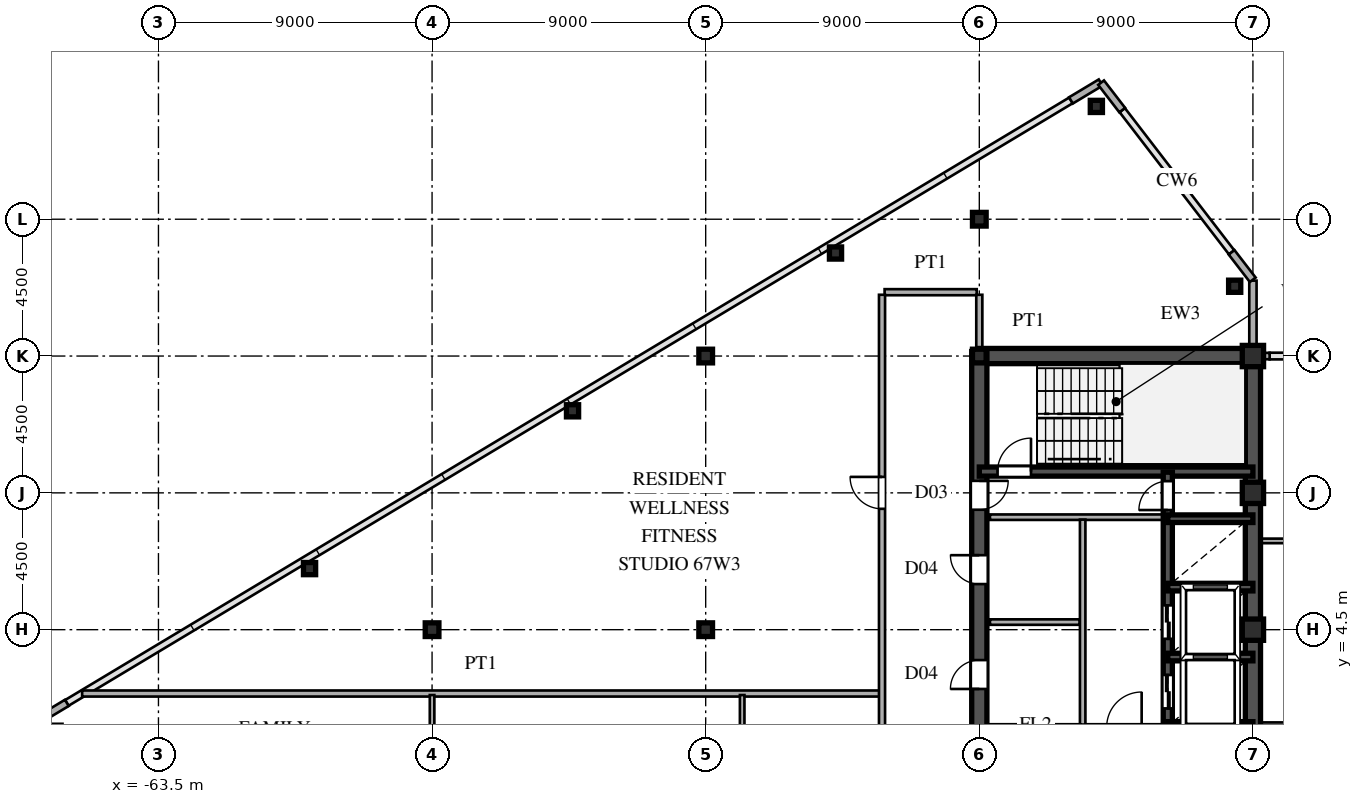
"""IFC4 building model, lengths in metres.
Left out: names, types, materials, properties, quantities, classifications, styles, units other than length and angle.
Written with IfcOpenShell. Run it as: python <this file> out.ifc"""

import sys

from ifc_helpers import new_model, si_unit, direction, frame, frame_2d, origin, origin_2d, place, context, subcontext, project, spatial, rectangle, hollow_rectangle, i_section, extrude, source, transform, mapped, element, fill, save


model = new_model("IFC4")
c1 = context("Model", 3, precision=1e-05, world=origin(), true_north=direction((0.0, 1.0)))
c2 = subcontext(c1, "Body", "Model", "MODEL_VIEW")
j1 = project(units=[si_unit("LENGTHUNIT", "METRE"), si_unit("PLANEANGLEUNIT", "RADIAN")], contexts=[c1])
p1 = place(None, origin())
s1 = spatial("IfcSite", under=j1, at=p1, CompositionType="ELEMENT")
p2 = place(p1, origin())
s2 = spatial("IfcBuilding", under=s1, at=p2, CompositionType="ELEMENT")
p3 = place(p2, frame((0.0, 0.0, 254.4)))
s3 = spatial("IfcBuildingStorey", under=s2, at=p3, CompositionType="ELEMENT", Elevation=254.4)
m1 = source(origin(), c2, "Body", "SweptSolid", [
    extrude(hollow_rectangle(XDim=0.7, YDim=0.7, WallThickness=0.03, at=origin_2d()), origin(), (0.0, 0.0, 1.0), 3.75),
])
for number, where, z_axis, x_axis in (
    (1, (-27.5, 4.5, 0.0), (0.0, 0.0, 1.0), (1.0, 0.0, 0.0)),
    (2, (-27.5, 9.0, 0.0), (0.0, 0.0, 1.0), (1.0, 0.0, 0.0)),
    (3, (-27.5, 13.5, 0.0), (0.0, 0.0, 1.0), (1.0, 0.0, 0.0)),
):
    element("IfcColumn", number, at=place(p3, frame(where, z_axis=z_axis, x_axis=x_axis)), inside=s3, PredefinedType="COLUMN", context=c2, shape_type="MappedRepresentation", body=[
        mapped(m1, transform((0.0, 0.0, 0.0), scale=1.0)),
    ])
m2 = source(origin(), c2, "Body", "SweptSolid", [
    extrude(i_section(OverallWidth=0.45, OverallDepth=0.45, WebThickness=0.016, FlangeThickness=0.025, at=origin_2d()), origin(), (0.0, 0.0, 1.0), 3.75),
])
for number, where, z_axis, x_axis in (
    (4, (-36.5, 13.5, 0.0), (0.0, 0.0, 1.0), (1.0, 0.0, 0.0)),
    (5, (-36.5, 18.0, 0.0), (0.0, 0.0, 1.0), (1.0, 0.0, 0.0)),
    (6, (-45.5, 4.5, 0.0), (0.0, 0.0, 1.0), (1.0, 0.0, 0.0)),
    (7, (-45.5, 13.5, 0.0), (0.0, 0.0, 1.0), (1.0, 0.0, 0.0)),
    (8, (-54.5, 4.5, 0.0), (0.0, 0.0, 1.0), (1.0, 0.0, 0.0)),
):
    element("IfcColumn", number, at=place(p3, frame(where, z_axis=z_axis, x_axis=x_axis)), inside=s3, PredefinedType="COLUMN", context=c2, shape_type="MappedRepresentation", body=[
        mapped(m2, transform((0.0, 0.0, 0.0), scale=1.0)),
    ])
m3 = source(origin(), c2, "Body", "SweptSolid", [
    extrude(hollow_rectangle(XDim=0.4, YDim=0.4, WallThickness=0.016, at=origin_2d()), origin(), (0.0, 0.0, 1.0), 3.75),
])
for number, where, z_axis, x_axis in (
    (9, (-28.1, 15.796, 0.0), (0.0, 0.0, 1.0), (1.0, 0.0, 0.0)),
    (10, (-32.65, 21.71, 0.0), (0.0, 0.0, 1.0), (1.0, 0.0, 0.0)),
    (11, (-41.23, 16.889, 0.0), (0.0, 0.0, 1.0), (1.0, 0.0, 0.0)),
    (12, (-49.88, 11.699, 0.0), (0.0, 0.0, 1.0), (1.0, 0.0, 0.0)),
    (13, (-58.53, 6.509, 0.0), (0.0, 0.0, 1.0), (1.0, 0.0, 0.0)),
):
    element("IfcColumn", number, at=place(p3, frame(where, z_axis=z_axis, x_axis=x_axis)), inside=s3, PredefinedType="COLUMN", context=c2, shape_type="MappedRepresentation", body=[
        mapped(m3, transform((0.0, 0.0, 0.0), scale=1.0)),
    ])
p4 = place(p3, frame((-27.5, 13.755, 0.0), z_axis=(0.0, 0.0, 1.0), x_axis=(0.0, 1.0, 0.0)))
e14 = element("IfcWall", 14, at=p4, inside=s3, PredefinedType="SOLIDWALL", context=c2, shape_type="SweptSolid", body=[
    extrude(rectangle(XDim=0.62, YDim=0.24, at=frame_2d((0.31, 0.0))), origin(), (0.0, 0.0, 1.0), 3.03),
])
p5 = place(p3, frame((-27.5, 14.375, 0.0), z_axis=(0.0, 0.0, 1.0), x_axis=(0.0, 1.0, 0.0)))
e15 = element("IfcWall", 15, at=p5, inside=s3, PredefinedType="SOLIDWALL", context=c2, shape_type="SweptSolid", body=[
    extrude(rectangle(XDim=1.605, YDim=0.24, at=frame_2d((0.803, 0.0))), origin(), (0.0, 0.0, 1.0), 3.53),
])
for number, where, z_axis, x_axis in (
    (16, (-27.506, 16.008, 0.0), (0.0, 0.0, 1.0), (-0.61, 0.793, 0.0)),
    (17, (-31.799, 21.588, 0.0), (0.0, 0.0, 1.0), (-0.61, 0.793, 0.0)),
    (18, (-32.509, 22.495, 0.0), (0.0, 0.0, 1.0), (-0.857, -0.515, 0.0)),
    (19, (-66.514, 2.092, 0.0), (0.0, 0.0, 1.0), (-0.857, -0.515, 0.0)),
):
    element("IfcWall", number, at=place(p3, frame(where, z_axis=z_axis, x_axis=x_axis)), inside=s3, PredefinedType="SOLIDWALL", context=c2, shape_type="SweptSolid", body=[
        extrude(rectangle(XDim=1.14, YDim=0.24, at=frame_2d((0.57, 0.0))), origin(), (0.0, 0.0, 1.0), 3.53),
    ])
p6 = place(p3, frame((-27.49, 13.5, 0.0), z_axis=(0.0, 0.0, 1.0), x_axis=(1.0, 0.0, 0.0)))
e20 = element("IfcWall", 20, at=p6, inside=s3, PredefinedType="SOLIDWALL", context=c2, shape_type="SweptSolid", body=[
    extrude(rectangle(XDim=0.54, YDim=0.21, at=frame_2d((0.27, 0.0))), origin(), (0.0, 0.0, 1.0), 3.03),
])
p7 = place(p3, frame((-27.5, 1.3, 0.0), z_axis=(0.0, 0.0, 1.0), x_axis=(0.0, 1.0, 0.0)))
e21 = element("IfcWall", 21, at=p7, inside=s3, PredefinedType="SHEAR", context=c2, shape_type="SweptSolid", body=[
    extrude(rectangle(XDim=12.2, YDim=0.5, at=frame_2d((6.1, 0.0))), origin(), (0.0, 0.0, 1.0), 3.53),
])
p8 = place(p3, frame((-36.5, 13.5, 0.0), z_axis=(0.0, 0.0, 1.0), x_axis=(1.0, 0.0, 0.0)))
e22 = element("IfcWall", 22, at=p8, inside=s3, PredefinedType="SHEAR", context=c2, shape_type="SweptSolid", body=[
    extrude(rectangle(XDim=9.0, YDim=0.5, at=frame_2d((4.5, 0.0))), origin(), (0.0, 0.0, 1.0), 3.53),
])
p9 = place(p3, frame((-36.5, 8.2, 0.0), z_axis=(0.0, 0.0, 1.0), x_axis=(0.0, 1.0, 0.0)))
e23 = element("IfcWall", 23, at=p9, inside=s3, PredefinedType="SHEAR", context=c2, shape_type="SweptSolid", body=[
    extrude(rectangle(XDim=5.45, YDim=0.5, at=frame_2d((2.725, 0.0))), origin(), (0.0, 0.0, 1.0), 3.53),
])
p10 = place(p9, frame((0.245, 0.0, 0.0)))
e24 = element("IfcOpeningElement", 24, at=p10, cuts=e23, PredefinedType="OPENING", context=c2, shape_type="SweptSolid", body=[
    extrude(rectangle(XDim=0.95, YDim=2.15, at=frame_2d((0.475, 1.075))), frame((0.0, 0.26, 0.0), z_axis=(0.0, -1.0, 0.0), x_axis=(1.0, 0.0, 0.0)), (0.0, 0.0, 1.0), 0.52),
])
p11 = place(p3, frame((-36.5, 1.3, 0.0), z_axis=(0.0, 0.0, 1.0), x_axis=(0.0, 1.0, 0.0)))
e25 = element("IfcWall", 25, at=p11, inside=s3, PredefinedType="SHEAR", context=c2, shape_type="SweptSolid", body=[
    extrude(rectangle(XDim=3.45, YDim=0.5, at=frame_2d((1.725, 0.0))), origin(), (0.0, 0.0, 1.0), 3.53),
])
p12 = place(p11, frame((1.25, 0.0, 0.0)))
e26 = element("IfcOpeningElement", 26, at=p12, cuts=e25, PredefinedType="OPENING", context=c2, shape_type="SweptSolid", body=[
    extrude(rectangle(XDim=0.95, YDim=2.15, at=frame_2d((0.475, 1.075))), frame((0.0, 0.26, 0.0), z_axis=(0.0, -1.0, 0.0), x_axis=(1.0, 0.0, 0.0)), (0.0, 0.0, 1.0), 0.52),
])
p13 = place(p3, frame((-36.5, 4.75, 0.0), z_axis=(0.0, 0.0, 1.0), x_axis=(0.0, 1.0, 0.0)))
e27 = element("IfcWall", 27, at=p13, inside=s3, PredefinedType="SHEAR", context=c2, shape_type="SweptSolid", body=[
    extrude(rectangle(XDim=3.45, YDim=0.5, at=frame_2d((1.725, 0.0))), origin(), (0.0, 0.0, 1.0), 3.53),
])
p14 = place(p13, frame((1.25, 0.0, 0.0)))
e28 = element("IfcOpeningElement", 28, at=p14, cuts=e27, PredefinedType="OPENING", context=c2, shape_type="SweptSolid", body=[
    extrude(rectangle(XDim=0.95, YDim=2.15, at=frame_2d((0.475, 1.075))), frame((0.0, 0.26, 0.0), z_axis=(0.0, -1.0, 0.0), x_axis=(1.0, 0.0, 0.0)), (0.0, 0.0, 1.0), 0.52),
])
p15 = place(p3, frame((-36.5, 9.7, 0.0), z_axis=(0.0, 0.0, 1.0), x_axis=(1.0, 0.0, 0.0)))
e29 = element("IfcWall", 29, at=p15, inside=s3, PredefinedType="SHEAR", context=c2, shape_type="SweptSolid", body=[
    extrude(rectangle(XDim=9.0, YDim=0.3, at=frame_2d((4.5, 0.0))), origin(), (0.0, 0.0, 1.0), 3.53),
])
p16 = place(p15, frame((0.6, 0.0, 0.0)))
e30 = element("IfcOpeningElement", 30, at=p16, cuts=e29, PredefinedType="OPENING", context=c2, shape_type="SweptSolid", body=[
    extrude(rectangle(XDim=1.1, YDim=2.2, at=frame_2d((0.55, 1.1))), frame((0.0, 0.16, 0.0), z_axis=(0.0, -1.0, 0.0), x_axis=(1.0, 0.0, 0.0)), (0.0, 0.0, 1.0), 0.32),
])
for number, where, z_axis, x_axis in (
    (31, (-30.3, 1.35, 0.0), (0.0, 0.0, 1.0), (1.0, 0.0, 0.0)),
    (32, (-30.3, 3.6, 0.0), (0.0, 0.0, 1.0), (1.0, 0.0, 0.0)),
    (33, (-30.3, 5.9, 0.0), (0.0, 0.0, 1.0), (1.0, 0.0, 0.0)),
    (34, (-30.3, 8.15, 0.0), (0.0, 0.0, 1.0), (1.0, 0.0, 0.0)),
):
    element("IfcWall", number, at=place(p3, frame(where, z_axis=z_axis, x_axis=x_axis)), inside=s3, PredefinedType="SHEAR", context=c2, shape_type="SweptSolid", body=[
        extrude(rectangle(XDim=2.8, YDim=0.25, at=frame_2d((1.4, 0.0))), origin(), (0.0, 0.0, 1.0), 3.53),
    ])
p17 = place(p3, frame((-30.3, 1.32, 0.0), z_axis=(0.0, 0.0, 1.0), x_axis=(0.0, 1.0, 0.0)))
e35 = element("IfcWall", 35, at=p17, inside=s3, PredefinedType="SHEAR", context=c2, shape_type="SweptSolid", body=[
    extrude(rectangle(XDim=2.28, YDim=0.3, at=frame_2d((1.14, 0.0))), origin(), (0.0, 0.0, 1.0), 3.53),
])
p18 = place(p17, frame((0.59, 0.0, 0.0)))
e36 = element("IfcOpeningElement", 36, at=p18, cuts=e35, PredefinedType="OPENING", context=c2, shape_type="SweptSolid", body=[
    extrude(rectangle(XDim=1.1, YDim=2.2, at=frame_2d((0.55, 1.1))), frame((0.0, 0.16, 0.0), z_axis=(0.0, -1.0, 0.0), x_axis=(1.0, 0.0, 0.0)), (0.0, 0.0, 1.0), 0.32),
])
p19 = place(p3, frame((-30.3, 3.6, 0.0), z_axis=(0.0, 0.0, 1.0), x_axis=(0.0, 1.0, 0.0)))
e37 = element("IfcWall", 37, at=p19, inside=s3, PredefinedType="SHEAR", context=c2, shape_type="SweptSolid", body=[
    extrude(rectangle(XDim=2.3, YDim=0.3, at=frame_2d((1.15, 0.0))), origin(), (0.0, 0.0, 1.0), 3.53),
])
p20 = place(p19, frame((0.6, 0.0, 0.0)))
e38 = element("IfcOpeningElement", 38, at=p20, cuts=e37, PredefinedType="OPENING", context=c2, shape_type="SweptSolid", body=[
    extrude(rectangle(XDim=1.1, YDim=2.2, at=frame_2d((0.55, 1.1))), frame((0.0, 0.16, 0.0), z_axis=(0.0, -1.0, 0.0), x_axis=(1.0, 0.0, 0.0)), (0.0, 0.0, 1.0), 0.32),
])
p21 = place(p3, frame((-30.3, 5.9, 0.0), z_axis=(0.0, 0.0, 1.0), x_axis=(0.0, 1.0, 0.0)))
e39 = element("IfcWall", 39, at=p21, inside=s3, PredefinedType="SHEAR", context=c2, shape_type="SweptSolid", body=[
    extrude(rectangle(XDim=2.25, YDim=0.3, at=frame_2d((1.125, 0.0))), origin(), (0.0, 0.0, 1.0), 3.53),
])
p22 = place(p3, frame((-30.3, 8.15, 0.0), z_axis=(0.0, 0.0, 1.0), x_axis=(0.0, 1.0, 0.0)))
e40 = element("IfcWall", 40, at=p22, inside=s3, PredefinedType="SHEAR", context=c2, shape_type="SweptSolid", body=[
    extrude(rectangle(XDim=1.53, YDim=0.3, at=frame_2d((0.765, 0.0))), origin(), (0.0, 0.0, 1.0), 3.53),
])
p23 = place(p22, frame((0.285, 0.0, 0.0)))
e41 = element("IfcOpeningElement", 41, at=p23, cuts=e40, PredefinedType="OPENING", context=c2, shape_type="SweptSolid", body=[
    extrude(rectangle(XDim=0.95, YDim=2.15, at=frame_2d((0.475, 1.075))), frame((0.0, 0.16, 0.0), z_axis=(0.0, -1.0, 0.0), x_axis=(1.0, 0.0, 0.0)), (0.0, 0.0, 1.0), 0.32),
])
p24 = place(p3, frame((-36.15, 8.2, 0.0), z_axis=(0.0, 0.0, 1.0), x_axis=(1.0, 0.0, 0.0)))
e42 = element("IfcWall", 42, at=p24, inside=s3, PredefinedType="PARTITIONING", context=c2, shape_type="SweptSolid", body=[
    extrude(rectangle(XDim=5.7, YDim=0.18, at=frame_2d((2.85, 0.0))), origin(), (0.0, 0.0, 1.0), 3.53),
])
p25 = place(p3, frame((-33.1, 1.38, 0.0), z_axis=(0.0, 0.0, 1.0), x_axis=(0.0, 1.0, 0.0)))
e43 = element("IfcWall", 43, at=p25, inside=s3, PredefinedType="PARTITIONING", context=c2, shape_type="SweptSolid", body=[
    extrude(rectangle(XDim=6.74, YDim=0.18, at=frame_2d((3.37, 0.0))), origin(), (0.0, 0.0, 1.0), 3.53),
])
p26 = place(p3, frame((-36.15, 4.75, 0.0), z_axis=(0.0, 0.0, 1.0), x_axis=(1.0, 0.0, 0.0)))
e44 = element("IfcWall", 44, at=p26, inside=s3, PredefinedType="PARTITIONING", context=c2, shape_type="SweptSolid", body=[
    extrude(rectangle(XDim=2.95, YDim=0.18, at=frame_2d((1.475, 0.0))), origin(), (0.0, 0.0, 1.0), 3.53),
])
p27 = place(p3, frame((-27.245, 1.35, 0.0), z_axis=(0.0, 0.0, 1.0), x_axis=(1.0, 0.0, 0.0)))
e45 = element("IfcWall", 45, at=p27, inside=s3, PredefinedType="PARTITIONING", context=c2, shape_type="SweptSolid", body=[
    extrude(rectangle(XDim=54.49, YDim=0.2, at=frame_2d((27.245, 0.0))), origin(), (0.0, 0.0, 1.0), 3.53),
])
p28 = place(p27, frame((24.97, 0.0, 0.0)))
e46 = element("IfcOpeningElement", 46, at=p28, cuts=e45, PredefinedType="OPENING", context=c2, shape_type="SweptSolid", body=[
    extrude(rectangle(XDim=1.05, YDim=2.25, at=frame_2d((0.525, 1.125))), frame((0.0, 0.11, 0.0), z_axis=(0.0, -1.0, 0.0), x_axis=(1.0, 0.0, 0.0)), (0.0, 0.0, 1.0), 0.22),
])
p29 = place(p3, frame((-66.01, 2.4, 0.0), z_axis=(0.0, 0.0, 1.0), x_axis=(1.0, 0.0, 0.0)))
e47 = element("IfcWall", 47, at=p29, inside=s3, PredefinedType="PARTITIONING", context=c2, shape_type="SweptSolid", body=[
    extrude(rectangle(XDim=26.23, YDim=0.2, at=frame_2d((13.115, 0.0))), origin(), (0.0, 0.0, 1.0), 3.53),
])
p30 = place(p3, frame((-27.245, 7.42, 0.0), z_axis=(0.0, 0.0, 1.0), x_axis=(1.0, 0.0, 0.0)))
e48 = element("IfcWall", 48, at=p30, inside=s3, PredefinedType="PARTITIONING", context=c2, shape_type="SweptSolid", body=[
    extrude(rectangle(XDim=7.66, YDim=0.15, at=frame_2d((3.83, 0.0))), origin(), (0.0, 0.0, 1.0), 3.53),
])
p31 = place(p30, frame((3.57, 0.0, 0.0)))
e49 = element("IfcOpeningElement", 49, at=p31, cuts=e48, PredefinedType="OPENING", context=c2, shape_type="SweptSolid", body=[
    extrude(rectangle(XDim=0.95, YDim=2.15, at=frame_2d((0.475, 1.075))), frame((0.0, 0.085, 0.0), z_axis=(0.0, -1.0, 0.0), x_axis=(1.0, 0.0, 0.0)), (0.0, 0.0, 1.0), 0.17),
])
p32 = place(p3, frame((-39.615, 15.6, 0.0), z_axis=(0.0, 0.0, 1.0), x_axis=(1.0, 0.0, 0.0)))
e50 = element("IfcWall", 50, at=p32, inside=s3, PredefinedType="PARTITIONING", context=c2, shape_type="SweptSolid", body=[
    extrude(rectangle(XDim=3.03, YDim=0.2, at=frame_2d((1.515, 0.0))), origin(), (0.0, 0.0, 1.0), 3.53),
])
p33 = place(p3, frame((-54.5, -9.335, 0.0), z_axis=(0.0, 0.0, 1.0), x_axis=(0.0, 1.0, 0.0)))
e51 = element("IfcWall", 51, at=p33, inside=s3, PredefinedType="PARTITIONING", context=c2, shape_type="SweptSolid", body=[
    extrude(rectangle(XDim=11.685, YDim=0.15, at=frame_2d((5.843, 0.0))), origin(), (0.0, 0.0, 1.0), 2.93),
])
p34 = place(p33, frame((5.107, 0.0, 0.0)))
e52 = element("IfcOpeningElement", 52, at=p34, cuts=e51, PredefinedType="OPENING", context=c2, shape_type="SweptSolid", body=[
    extrude(rectangle(XDim=0.95, YDim=2.15, at=frame_2d((0.475, 1.075))), frame((0.0, 0.085, 0.0), z_axis=(0.0, -1.0, 0.0), x_axis=(1.0, 0.0, 0.0)), (0.0, 0.0, 1.0), 0.17),
])
p35 = place(p33, frame((1.21, 0.0, 0.0)))
e53 = element("IfcOpeningElement", 53, at=p35, cuts=e51, PredefinedType="OPENING", context=c2, shape_type="SweptSolid", body=[
    extrude(rectangle(XDim=0.95, YDim=2.15, at=frame_2d((0.475, 1.075))), frame((0.0, 0.085, 0.0), z_axis=(0.0, -1.0, 0.0), x_axis=(1.0, 0.0, 0.0)), (0.0, 0.0, 1.0), 0.17),
])
p36 = place(p33, frame((9.16, 0.0, 0.0)))
e54 = element("IfcOpeningElement", 54, at=p36, cuts=e51, PredefinedType="OPENING", context=c2, shape_type="SweptSolid", body=[
    extrude(rectangle(XDim=0.95, YDim=2.15, at=frame_2d((0.475, 1.075))), frame((0.0, 0.085, 0.0), z_axis=(0.0, -1.0, 0.0), x_axis=(1.0, 0.0, 0.0)), (0.0, 0.0, 1.0), 0.17),
])
p37 = place(p3, frame((-44.3, -1.328, 0.0), z_axis=(0.0, 0.0, 1.0), x_axis=(0.0, 1.0, 0.0)))
e55 = element("IfcWall", 55, at=p37, inside=s3, PredefinedType="PARTITIONING", context=c2, shape_type="SweptSolid", body=[
    extrude(rectangle(XDim=3.678, YDim=0.15, at=frame_2d((1.839, 0.0))), origin(), (0.0, 0.0, 1.0), 3.53),
])
p38 = place(p3, frame((-39.7, -15.515, 0.0), z_axis=(0.0, 0.0, 1.0), x_axis=(0.0, 1.0, 0.0)))
e56 = element("IfcWall", 56, at=p38, inside=s3, PredefinedType="PARTITIONING", context=c2, shape_type="SweptSolid", body=[
    extrude(rectangle(XDim=31.03, YDim=0.2, at=frame_2d((15.515, 0.0))), origin(), (0.0, 0.0, 1.0), 3.53),
])
p39 = place(p38, frame((2.09, 0.0, 0.0)))
e57 = element("IfcOpeningElement", 57, at=p39, cuts=e56, PredefinedType="OPENING", context=c2, shape_type="SweptSolid", body=[
    extrude(rectangle(XDim=1.05, YDim=2.25, at=frame_2d((0.525, 1.125))), frame((0.0, 0.11, 0.0), z_axis=(0.0, -1.0, 0.0), x_axis=(1.0, 0.0, 0.0)), (0.0, 0.0, 1.0), 0.22),
])
p40 = place(p38, frame((10.901, 0.0, 0.0)))
e58 = element("IfcOpeningElement", 58, at=p40, cuts=e56, PredefinedType="OPENING", context=c2, shape_type="SweptSolid", body=[
    extrude(rectangle(XDim=1.05, YDim=2.25, at=frame_2d((0.525, 1.125))), frame((0.0, 0.11, 0.0), z_axis=(0.0, -1.0, 0.0), x_axis=(1.0, 0.0, 0.0)), (0.0, 0.0, 1.0), 0.22),
])
p41 = place(p38, frame((23.99, 0.0, 0.0)))
e59 = element("IfcOpeningElement", 59, at=p41, cuts=e56, PredefinedType="OPENING", context=c2, shape_type="SweptSolid", body=[
    extrude(rectangle(XDim=1.05, YDim=2.25, at=frame_2d((0.525, 1.125))), frame((0.0, 0.11, 0.0), z_axis=(0.0, -1.0, 0.0), x_axis=(1.0, 0.0, 0.0)), (0.0, 0.0, 1.0), 0.22),
])
p42 = place(p3, frame((-36.5, 13.755, 0.0), z_axis=(0.0, 0.0, 1.0), x_axis=(0.0, 1.0, 0.0)))
e60 = element("IfcWall", 60, at=p42, inside=s3, PredefinedType="PARTITIONING", context=c2, shape_type="SweptSolid", body=[
    extrude(rectangle(XDim=1.76, YDim=0.2, at=frame_2d((0.88, 0.0))), origin(), (0.0, 0.0, 1.0), 2.93),
])
m4 = source(origin(), c2, "Body", "SweptSolid", [
    extrude(rectangle(XDim=0.95, YDim=2.15, at=frame_2d((0.475, 1.075))), frame((0.0, 0.025, 0.0), z_axis=(0.0, -1.0, 0.0), x_axis=(1.0, 0.0, 0.0)), (0.0, 0.0, 1.0), 0.05),
])
p43 = place(p10, frame((0.95, 0.0, 0.0), z_axis=(0.0, 0.0, 1.0), x_axis=(-1.0, 0.0, 0.0)))
e61 = element("IfcDoor", 61, at=p43, inside=s3, OperationType="SINGLE_SWING_RIGHT", PredefinedType="DOOR", context=c2, shape_type="MappedRepresentation", body=[
    mapped(m4, transform((0.0, 0.0, 0.0), scale=1.0)),
])
fill(e24, e61)
p44 = place(p12, origin())
e62 = element("IfcDoor", 62, at=p44, inside=s3, OperationType="SINGLE_SWING_LEFT", PredefinedType="DOOR", context=c2, shape_type="MappedRepresentation", body=[
    mapped(m4, transform((0.0, 0.0, 0.0), scale=1.0)),
])
fill(e26, e62)
p45 = place(p14, origin())
e63 = element("IfcDoor", 63, at=p45, inside=s3, OperationType="SINGLE_SWING_RIGHT", PredefinedType="DOOR", context=c2, shape_type="MappedRepresentation", body=[
    mapped(m4, transform((0.0, 0.0, 0.0), scale=1.0)),
])
fill(e28, e63)
m5 = source(origin(), c2, "Body", "SweptSolid", [
    extrude(rectangle(XDim=1.1, YDim=2.2, at=frame_2d((0.55, 1.1))), frame((0.0, 0.025, 0.0), z_axis=(0.0, -1.0, 0.0), x_axis=(1.0, 0.0, 0.0)), (0.0, 0.0, 1.0), 0.05),
])
p46 = place(p16, origin())
e64 = element("IfcDoor", 64, at=p46, inside=s3, OperationType="SINGLE_SWING_RIGHT", PredefinedType="DOOR", context=c2, shape_type="MappedRepresentation", body=[
    mapped(m5, transform((0.0, 0.0, 0.0), scale=1.0)),
])
fill(e30, e64)
m6 = source(origin(), c2, "Body", "SweptSolid", [
    extrude(rectangle(XDim=1.1, YDim=2.2, at=frame_2d((0.55, 1.1))), frame((0.0, 0.025, 0.0), z_axis=(0.0, -1.0, 0.0), x_axis=(1.0, 0.0, 0.0)), (0.0, 0.0, 1.0), 0.05),
])
p47 = place(p18, origin())
e65 = element("IfcDoor", 65, at=p47, inside=s3, OperationType="DOUBLE_DOOR_SLIDING", PredefinedType="DOOR", context=c2, shape_type="MappedRepresentation", body=[
    mapped(m6, transform((0.0, 0.0, 0.0), scale=1.0)),
])
fill(e36, e65)
p48 = place(p20, origin())
e66 = element("IfcDoor", 66, at=p48, inside=s3, OperationType="DOUBLE_DOOR_SLIDING", PredefinedType="DOOR", context=c2, shape_type="MappedRepresentation", body=[
    mapped(m6, transform((0.0, 0.0, 0.0), scale=1.0)),
])
fill(e38, e66)
p49 = place(p23, origin())
e67 = element("IfcDoor", 67, at=p49, inside=s3, OperationType="SINGLE_SWING_LEFT", PredefinedType="DOOR", context=c2, shape_type="MappedRepresentation", body=[
    mapped(m4, transform((0.0, 0.0, 0.0), scale=1.0)),
])
fill(e41, e67)
m7 = source(origin(), c2, "Body", "SweptSolid", [
    extrude(rectangle(XDim=1.05, YDim=2.25, at=frame_2d((0.525, 1.125))), frame((0.0, 0.025, 0.0), z_axis=(0.0, -1.0, 0.0), x_axis=(1.0, 0.0, 0.0)), (0.0, 0.0, 1.0), 0.05),
])
p50 = place(p41, origin())
e68 = element("IfcDoor", 68, at=p50, inside=s3, OperationType="SINGLE_SWING_RIGHT", PredefinedType="DOOR", context=c2, shape_type="MappedRepresentation", body=[
    mapped(m7, transform((0.0, 0.0, 0.0), scale=1.0)),
])
fill(e59, e68)
save(model, sys.argv[1])
